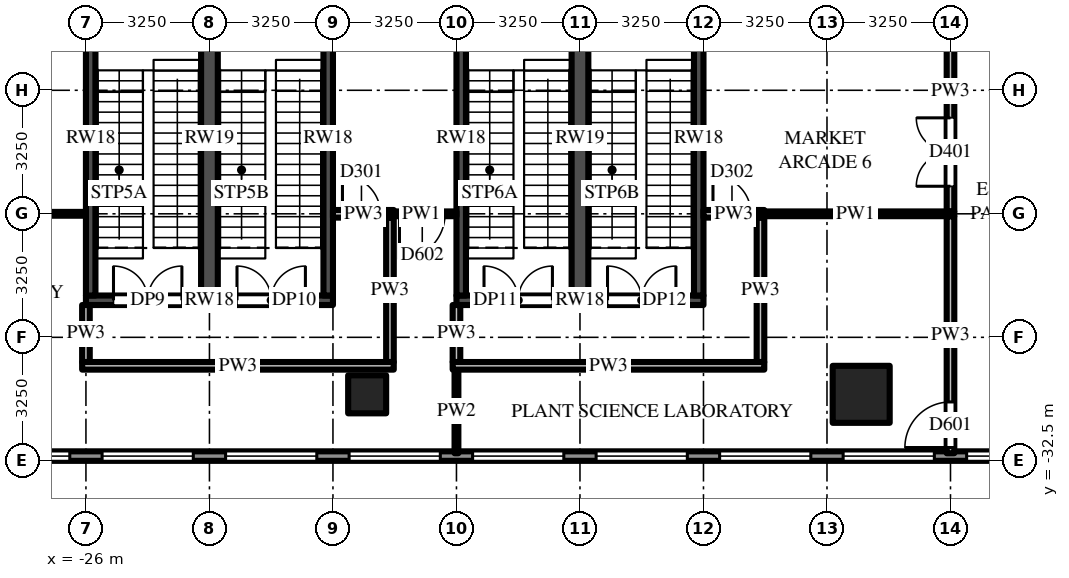
"""IFC4 building model, lengths in metres.
Left out: names, types, materials, properties, quantities, classifications, styles, units other than length and angle.
Written with IfcOpenShell. Run it as: python <this file> out.ifc"""

import sys

from ifc_helpers import new_model, si_unit, direction, frame, frame_2d, origin, origin_2d, place, context, subcontext, project, spatial, rectangle, extrude, source, transform, mapped, element, fill, save


model = new_model("IFC4")
c1 = context("Model", 3, precision=1e-05, world=origin(), true_north=direction((0.0, 1.0)))
c2 = subcontext(c1, "Body", "Model", "MODEL_VIEW")
j1 = project(units=[si_unit("LENGTHUNIT", "METRE"), si_unit("PLANEANGLEUNIT", "RADIAN")], contexts=[c1])
p1 = place(None, origin())
s1 = spatial("IfcSite", under=j1, at=p1, CompositionType="ELEMENT")
p2 = place(p1, origin())
s2 = spatial("IfcBuilding", under=s1, at=p2, CompositionType="ELEMENT")
p3 = place(p2, frame((0.0, 0.0, 24.0)))
s3 = spatial("IfcBuildingStorey", under=s2, at=p3, CompositionType="ELEMENT", Elevation=24.0)
m1 = source(origin(), c2, "Body", "SweptSolid", [
    extrude(rectangle(XDim=1.5, YDim=1.5, at=origin_2d()), origin(), (0.0, 0.0, 1.0), 5.0),
])
p4 = place(p3, frame((-5.6, -30.75, 0.0), z_axis=(0.0, 0.0, 1.0), x_axis=(1.0, 0.0, 0.0)))
e1 = element("IfcColumn", 1, at=p4, inside=s3, PredefinedType="COLUMN", context=c2, shape_type="MappedRepresentation", body=[
    mapped(m1, transform((0.0, 0.0, 0.0))),
])
m2 = source(origin(), c2, "Body", "SweptSolid", [
    extrude(rectangle(XDim=1.0, YDim=1.0, at=origin_2d()), origin(), (0.0, 0.0, 1.0), 5.0),
])
p5 = place(p3, frame((-18.6, -30.75, 0.0), z_axis=(0.0, 0.0, 1.0), x_axis=(1.0, 0.0, 0.0)))
e2 = element("IfcColumn", 2, at=p5, inside=s3, PredefinedType="COLUMN", context=c2, shape_type="MappedRepresentation", body=[
    mapped(m2, transform((0.0, 0.0, 0.0))),
])
m3 = source(origin(), c2, "Body", "SweptSolid", [
    extrude(rectangle(XDim=6.5, YDim=0.25, at=frame_2d((3.25, 0.0))), origin(), (0.0, 0.0, 1.0), 4.7),
])
p6 = place(p3, frame((-26.0, -28.275, 0.0), z_axis=(0.0, 0.0, 1.0), x_axis=(1.0, 0.0, 0.0)))
e3 = element("IfcWall", 3, at=p6, inside=s3, PredefinedType="SHEAR", context=c2, shape_type="MappedRepresentation", body=[
    mapped(m3, transform((0.0, 0.0, 0.0))),
])
m4 = source(origin(), c2, "Body", "SweptSolid", [
    extrude(rectangle(XDim=1.8, YDim=2.1, at=frame_2d((0.9, 1.05))), frame((0.0, 0.135, 0.0), z_axis=(0.0, -1.0, 0.0), x_axis=(1.0, 0.0, 0.0)), (0.0, 0.0, 1.0), 0.27),
])
p7 = place(p6, frame((0.725, 0.0, 0.0)))
e4 = element("IfcOpeningElement", 4, at=p7, cuts=e3, PredefinedType="OPENING", context=c2, shape_type="MappedRepresentation", body=[
    mapped(m4, transform((0.0, 0.0, 0.0))),
])
p8 = place(p6, frame((3.975, 0.0, 0.0)))
e5 = element("IfcOpeningElement", 5, at=p8, cuts=e3, PredefinedType="OPENING", context=c2, shape_type="MappedRepresentation", body=[
    mapped(m4, transform((0.0, 0.0, 0.0))),
])
m5 = source(origin(), c2, "Body", "SweptSolid", [
    extrude(rectangle(XDim=8.3, YDim=0.25, at=frame_2d((4.15, 0.0))), origin(), (0.0, 0.0, 1.0), 4.7),
])
for number, where, z_axis, x_axis in (
    (6, (-25.875, -28.15, 0.0), (0.0, 0.0, 1.0), (0.0, 1.0, 0.0)),
    (7, (-19.625, -28.15, 0.0), (0.0, 0.0, 1.0), (0.0, 1.0, 0.0)),
):
    element("IfcWall", number, at=place(p3, frame(where, z_axis=z_axis, x_axis=x_axis)), inside=s3, PredefinedType="SHEAR", context=c2, shape_type="MappedRepresentation", body=[
        mapped(m5, transform((0.0, 0.0, 0.0))),
    ])
m6 = source(origin(), c2, "Body", "SweptSolid", [
    extrude(rectangle(XDim=8.3, YDim=0.44, at=frame_2d((4.15, 0.0))), origin(), (0.0, 0.0, 1.0), 4.7),
])
p9 = place(p3, frame((-22.75, -28.15, 0.0), z_axis=(0.0, 0.0, 1.0), x_axis=(0.0, 1.0, 0.0)))
e8 = element("IfcWall", 8, at=p9, inside=s3, PredefinedType="SHEAR", context=c2, shape_type="MappedRepresentation", body=[
    mapped(m6, transform((0.0, 0.0, 0.0))),
])
p10 = place(p3, frame((-16.25, -28.275, 0.0), z_axis=(0.0, 0.0, 1.0), x_axis=(1.0, 0.0, 0.0)))
e9 = element("IfcWall", 9, at=p10, inside=s3, PredefinedType="SHEAR", context=c2, shape_type="MappedRepresentation", body=[
    mapped(m3, transform((0.0, 0.0, 0.0))),
])
p11 = place(p10, frame((0.725, 0.0, 0.0)))
e10 = element("IfcOpeningElement", 10, at=p11, cuts=e9, PredefinedType="OPENING", context=c2, shape_type="MappedRepresentation", body=[
    mapped(m4, transform((0.0, 0.0, 0.0))),
])
p12 = place(p10, frame((3.975, 0.0, 0.0)))
e11 = element("IfcOpeningElement", 11, at=p12, cuts=e9, PredefinedType="OPENING", context=c2, shape_type="MappedRepresentation", body=[
    mapped(m4, transform((0.0, 0.0, 0.0))),
])
for number, where, z_axis, x_axis in (
    (12, (-16.125, -28.15, 0.0), (0.0, 0.0, 1.0), (0.0, 1.0, 0.0)),
    (13, (-9.875, -28.15, 0.0), (0.0, 0.0, 1.0), (0.0, 1.0, 0.0)),
):
    element("IfcWall", number, at=place(p3, frame(where, z_axis=z_axis, x_axis=x_axis)), inside=s3, PredefinedType="SHEAR", context=c2, shape_type="MappedRepresentation", body=[
        mapped(m5, transform((0.0, 0.0, 0.0))),
    ])
p13 = place(p3, frame((-13.0, -28.15, 0.0), z_axis=(0.0, 0.0, 1.0), x_axis=(0.0, 1.0, 0.0)))
e14 = element("IfcWall", 14, at=p13, inside=s3, PredefinedType="SHEAR", context=c2, shape_type="MappedRepresentation", body=[
    mapped(m6, transform((0.0, 0.0, 0.0))),
])
m7 = source(origin(), c2, "Body", "SweptSolid", [
    extrude(rectangle(XDim=58.5, YDim=0.25, at=frame_2d((29.25, 0.0))), origin(), (0.0, 0.0, 1.0), 4.7),
])
p14 = place(p3, frame((-29.25, -32.375, 0.0), z_axis=(0.0, 0.0, 1.0), x_axis=(1.0, 0.0, 0.0)))
e15 = element("IfcWall", 15, at=p14, inside=s3, PredefinedType="SOLIDWALL", context=c2, shape_type="MappedRepresentation", body=[
    mapped(m7, transform((0.0, 0.0, 0.0))),
])
m8 = source(origin(), c2, "Body", "SweptSolid", [
    extrude(rectangle(XDim=2.4, YDim=3.3, at=frame_2d((1.2, 1.65))), frame((0.0, 0.135, 0.0), z_axis=(0.0, -1.0, 0.0), x_axis=(1.0, 0.0, 0.0)), (0.0, 0.0, 1.0), 0.27),
])
p15 = place(p14, frame((0.425, 0.0, 0.6)))
e16 = element("IfcOpeningElement", 16, at=p15, cuts=e15, PredefinedType="OPENING", context=c2, shape_type="MappedRepresentation", body=[
    mapped(m8, transform((0.0, 0.0, 0.0))),
])
p16 = place(p14, frame((3.675, 0.0, 0.6)))
e17 = element("IfcOpeningElement", 17, at=p16, cuts=e15, PredefinedType="OPENING", context=c2, shape_type="MappedRepresentation", body=[
    mapped(m8, transform((0.0, 0.0, 0.0))),
])
p17 = place(p14, frame((6.925, 0.0, 0.6)))
e18 = element("IfcOpeningElement", 18, at=p17, cuts=e15, PredefinedType="OPENING", context=c2, shape_type="MappedRepresentation", body=[
    mapped(m8, transform((0.0, 0.0, 0.0))),
])
p18 = place(p14, frame((10.175, 0.0, 0.6)))
e19 = element("IfcOpeningElement", 19, at=p18, cuts=e15, PredefinedType="OPENING", context=c2, shape_type="MappedRepresentation", body=[
    mapped(m8, transform((0.0, 0.0, 0.0))),
])
p19 = place(p14, frame((13.425, 0.0, 0.6)))
e20 = element("IfcOpeningElement", 20, at=p19, cuts=e15, PredefinedType="OPENING", context=c2, shape_type="MappedRepresentation", body=[
    mapped(m8, transform((0.0, 0.0, 0.0))),
])
p20 = place(p14, frame((16.675, 0.0, 0.6)))
e21 = element("IfcOpeningElement", 21, at=p20, cuts=e15, PredefinedType="OPENING", context=c2, shape_type="MappedRepresentation", body=[
    mapped(m8, transform((0.0, 0.0, 0.0))),
])
p21 = place(p14, frame((19.925, 0.0, 0.6)))
e22 = element("IfcOpeningElement", 22, at=p21, cuts=e15, PredefinedType="OPENING", context=c2, shape_type="MappedRepresentation", body=[
    mapped(m8, transform((0.0, 0.0, 0.0))),
])
p22 = place(p14, frame((23.175, 0.0, 0.6)))
e23 = element("IfcOpeningElement", 23, at=p22, cuts=e15, PredefinedType="OPENING", context=c2, shape_type="MappedRepresentation", body=[
    mapped(m8, transform((0.0, 0.0, 0.0))),
])
p23 = place(p14, frame((26.425, 0.0, 0.6)))
e24 = element("IfcOpeningElement", 24, at=p23, cuts=e15, PredefinedType="OPENING", context=c2, shape_type="MappedRepresentation", body=[
    mapped(m8, transform((0.0, 0.0, 0.0))),
])
p24 = place(p14, frame((29.675, 0.0, 0.6)))
e25 = element("IfcOpeningElement", 25, at=p24, cuts=e15, PredefinedType="OPENING", context=c2, shape_type="MappedRepresentation", body=[
    mapped(m8, transform((0.0, 0.0, 0.0))),
])
p25 = place(p14, frame((32.925, 0.0, 0.6)))
e26 = element("IfcOpeningElement", 26, at=p25, cuts=e15, PredefinedType="OPENING", context=c2, shape_type="MappedRepresentation", body=[
    mapped(m8, transform((0.0, 0.0, 0.0))),
])
p26 = place(p14, frame((36.175, 0.0, 0.6)))
e27 = element("IfcOpeningElement", 27, at=p26, cuts=e15, PredefinedType="OPENING", context=c2, shape_type="MappedRepresentation", body=[
    mapped(m8, transform((0.0, 0.0, 0.0))),
])
p27 = place(p14, frame((39.425, 0.0, 0.6)))
e28 = element("IfcOpeningElement", 28, at=p27, cuts=e15, PredefinedType="OPENING", context=c2, shape_type="MappedRepresentation", body=[
    mapped(m8, transform((0.0, 0.0, 0.0))),
])
p28 = place(p14, frame((42.675, 0.0, 0.6)))
e29 = element("IfcOpeningElement", 29, at=p28, cuts=e15, PredefinedType="OPENING", context=c2, shape_type="MappedRepresentation", body=[
    mapped(m8, transform((0.0, 0.0, 0.0))),
])
p29 = place(p14, frame((45.925, 0.0, 0.6)))
e30 = element("IfcOpeningElement", 30, at=p29, cuts=e15, PredefinedType="OPENING", context=c2, shape_type="MappedRepresentation", body=[
    mapped(m8, transform((0.0, 0.0, 0.0))),
])
p30 = place(p14, frame((49.175, 0.0, 0.6)))
e31 = element("IfcOpeningElement", 31, at=p30, cuts=e15, PredefinedType="OPENING", context=c2, shape_type="MappedRepresentation", body=[
    mapped(m8, transform((0.0, 0.0, 0.0))),
])
p31 = place(p14, frame((52.425, 0.0, 0.6)))
e32 = element("IfcOpeningElement", 32, at=p31, cuts=e15, PredefinedType="OPENING", context=c2, shape_type="MappedRepresentation", body=[
    mapped(m8, transform((0.0, 0.0, 0.0))),
])
p32 = place(p14, frame((55.675, 0.0, 0.6)))
e33 = element("IfcOpeningElement", 33, at=p32, cuts=e15, PredefinedType="OPENING", context=c2, shape_type="MappedRepresentation", body=[
    mapped(m8, transform((0.0, 0.0, 0.0))),
])
m9 = source(origin(), c2, "Body", "SweptSolid", [
    extrude(rectangle(XDim=1.5, YDim=0.2, at=frame_2d((0.75, 0.0))), origin(), (0.0, 0.0, 1.0), 4.7),
])
p33 = place(p3, frame((-26.0, -29.9, 0.0), z_axis=(0.0, 0.0, 1.0), x_axis=(0.0, 1.0, 0.0)))
e34 = element("IfcWall", 34, at=p33, inside=s3, PredefinedType="PARTITIONING", context=c2, shape_type="MappedRepresentation", body=[
    mapped(m9, transform((0.0, 0.0, 0.0))),
])
m10 = source(origin(), c2, "Body", "SweptSolid", [
    extrude(rectangle(XDim=3.8, YDim=0.2, at=frame_2d((1.9, 0.0))), origin(), (0.0, 0.0, 1.0), 4.274),
])
p34 = place(p3, frame((-18.0, -29.9, 0.0), z_axis=(0.0, 0.0, 1.0), x_axis=(0.0, 1.0, 0.0)))
e35 = element("IfcWall", 35, at=p34, inside=s3, PredefinedType="PARTITIONING", context=c2, shape_type="MappedRepresentation", body=[
    mapped(m10, transform((0.0, 0.0, 0.0))),
])
p35 = place(p3, frame((-16.25, -29.9, 0.0), z_axis=(0.0, 0.0, 1.0), x_axis=(0.0, 1.0, 0.0)))
e36 = element("IfcWall", 36, at=p35, inside=s3, PredefinedType="PARTITIONING", context=c2, shape_type="MappedRepresentation", body=[
    mapped(m9, transform((0.0, 0.0, 0.0))),
])
m11 = source(origin(), c2, "Body", "SweptSolid", [
    extrude(rectangle(XDim=2.2, YDim=0.1, at=frame_2d((1.1, 0.0))), origin(), (0.0, 0.0, 1.0), 3.762),
])
p36 = place(p3, frame((-16.25, -32.3, 0.0), z_axis=(0.0, 0.0, 1.0), x_axis=(0.0, 1.0, 0.0)))
e37 = element("IfcWall", 37, at=p36, inside=s3, PredefinedType="PARTITIONING", context=c2, shape_type="MappedRepresentation", body=[
    mapped(m11, transform((0.0, 0.0, 0.0))),
])
p37 = place(p3, frame((-8.25, -26.1, 0.0), z_axis=(0.0, 0.0, 1.0), x_axis=(0.0, -1.0, 0.0)))
e38 = element("IfcWall", 38, at=p37, inside=s3, PredefinedType="PARTITIONING", context=c2, shape_type="MappedRepresentation", body=[
    mapped(m10, transform((0.0, 0.0, 0.0))),
])
m12 = source(origin(), c2, "Body", "SweptSolid", [
    extrude(rectangle(XDim=3.188, YDim=0.2, at=frame_2d((1.594, 0.0))), origin(), (0.0, 0.0, 1.0), 4.7),
])
p38 = place(p3, frame((-3.25, -25.938, 0.0), z_axis=(0.0, 0.0, 1.0), x_axis=(0.0, 1.0, 0.0)))
e39 = element("IfcWall", 39, at=p38, inside=s3, PredefinedType="PARTITIONING", context=c2, shape_type="MappedRepresentation", body=[
    mapped(m12, transform((0.0, 0.0, 0.0))),
])
m13 = source(origin(), c2, "Body", "SweptSolid", [
    extrude(rectangle(XDim=1.8, YDim=2.1, at=frame_2d((0.9, 1.05))), frame((0.0, 0.11, 0.0), z_axis=(0.0, -1.0, 0.0), x_axis=(1.0, 0.0, 0.0)), (0.0, 0.0, 1.0), 0.22),
])
p39 = place(p38, frame((0.663, 0.0, 0.0)))
e40 = element("IfcOpeningElement", 40, at=p39, cuts=e39, PredefinedType="OPENING", context=c2, shape_type="MappedRepresentation", body=[
    mapped(m13, transform((0.0, 0.0, 0.0))),
])
m14 = source(origin(), c2, "Body", "SweptSolid", [
    extrude(rectangle(XDim=6.238, YDim=0.2, at=frame_2d((3.119, 0.0))), origin(), (0.0, 0.0, 1.0), 3.918),
])
p40 = place(p3, frame((-3.25, -32.3, 0.0), z_axis=(0.0, 0.0, 1.0), x_axis=(0.0, 1.0, 0.0)))
e41 = element("IfcWall", 41, at=p40, inside=s3, PredefinedType="PARTITIONING", context=c2, shape_type="MappedRepresentation", body=[
    mapped(m14, transform((0.0, 0.0, 0.0))),
])
m15 = source(origin(), c2, "Body", "SweptSolid", [
    extrude(rectangle(XDim=1.2, YDim=2.1, at=frame_2d((0.6, 1.05))), frame((0.0, 0.11, 0.0), z_axis=(0.0, -1.0, 0.0), x_axis=(1.0, 0.0, 0.0)), (0.0, 0.0, 1.0), 0.22),
])
p41 = place(p40, frame((0.15, 0.0, 0.0)))
e42 = element("IfcOpeningElement", 42, at=p41, cuts=e41, PredefinedType="OPENING", context=c2, shape_type="MappedRepresentation", body=[
    mapped(m15, transform((0.0, 0.0, 0.0))),
])
m16 = source(origin(), c2, "Body", "SweptSolid", [
    extrude(rectangle(XDim=3.15, YDim=0.2, at=frame_2d((1.575, 0.0))), origin(), (0.0, 0.0, 1.0), 4.7),
])
p42 = place(p3, frame((-3.25, -22.75, 0.0), z_axis=(0.0, 0.0, 1.0), x_axis=(0.0, 1.0, 0.0)))
e43 = element("IfcWall", 43, at=p42, inside=s3, PredefinedType="PARTITIONING", context=c2, shape_type="MappedRepresentation", body=[
    mapped(m16, transform((0.0, 0.0, 0.0))),
])
m17 = source(origin(), c2, "Body", "SweptSolid", [
    extrude(rectangle(XDim=8.2, YDim=0.2, at=frame_2d((4.1, 0.0))), origin(), (0.0, 0.0, 1.0), 3.762),
])
p43 = place(p3, frame((-26.1, -30.0, 0.0), z_axis=(0.0, 0.0, 1.0), x_axis=(1.0, 0.0, 0.0)))
e44 = element("IfcWall", 44, at=p43, inside=s3, PredefinedType="PARTITIONING", context=c2, shape_type="MappedRepresentation", body=[
    mapped(m17, transform((0.0, 0.0, 0.0))),
])
m18 = source(origin(), c2, "Body", "SweptSolid", [
    extrude(rectangle(XDim=8.2, YDim=0.2, at=frame_2d((4.1, 0.0))), origin(), (0.0, 0.0, 1.0), 4.7),
])
p44 = place(p3, frame((-16.35, -30.0, 0.0), z_axis=(0.0, 0.0, 1.0), x_axis=(1.0, 0.0, 0.0)))
e45 = element("IfcWall", 45, at=p44, inside=s3, PredefinedType="PARTITIONING", context=c2, shape_type="MappedRepresentation", body=[
    mapped(m18, transform((0.0, 0.0, 0.0))),
])
m19 = source(origin(), c2, "Body", "SweptSolid", [
    extrude(rectangle(XDim=1.6, YDim=0.2, at=frame_2d((0.8, 0.0))), origin(), (0.0, 0.0, 1.0), 3.762),
])
p45 = place(p3, frame((-19.5, -26.0, 0.0), z_axis=(0.0, 0.0, 1.0), x_axis=(1.0, 0.0, 0.0)))
e46 = element("IfcWall", 46, at=p45, inside=s3, PredefinedType="PARTITIONING", context=c2, shape_type="MappedRepresentation", body=[
    mapped(m19, transform((0.0, 0.0, 0.0))),
])
m20 = source(origin(), c2, "Body", "SweptSolid", [
    extrude(rectangle(XDim=1.0, YDim=2.1, at=frame_2d((0.5, 1.05))), frame((0.0, 0.11, 0.0), z_axis=(0.0, -1.0, 0.0), x_axis=(1.0, 0.0, 0.0)), (0.0, 0.0, 1.0), 0.22),
])
p46 = place(p45, frame((0.25, 0.0, 0.0)))
e47 = element("IfcOpeningElement", 47, at=p46, cuts=e46, PredefinedType="OPENING", context=c2, shape_type="MappedRepresentation", body=[
    mapped(m20, transform((0.0, 0.0, 0.0))),
])
m21 = source(origin(), c2, "Body", "SweptSolid", [
    extrude(rectangle(XDim=1.6, YDim=0.2, at=frame_2d((0.8, 0.0))), origin(), (0.0, 0.0, 1.0), 4.7),
])
p47 = place(p3, frame((-9.75, -26.0, 0.0), z_axis=(0.0, 0.0, 1.0), x_axis=(1.0, 0.0, 0.0)))
e48 = element("IfcWall", 48, at=p47, inside=s3, PredefinedType="PARTITIONING", context=c2, shape_type="MappedRepresentation", body=[
    mapped(m21, transform((0.0, 0.0, 0.0))),
])
p48 = place(p47, frame((0.25, 0.0, 0.0)))
e49 = element("IfcOpeningElement", 49, at=p48, cuts=e48, PredefinedType="OPENING", context=c2, shape_type="MappedRepresentation", body=[
    mapped(m20, transform((0.0, 0.0, 0.0))),
])
m22 = source(origin(), c2, "Body", "SweptSolid", [
    extrude(rectangle(XDim=6.3, YDim=0.1, at=frame_2d((3.15, 0.0))), origin(), (0.0, 0.0, 1.0), 3.762),
])
p49 = place(p3, frame((-32.3, -26.0, 0.0), z_axis=(0.0, 0.0, 1.0), x_axis=(1.0, 0.0, 0.0)))
e50 = element("IfcWall", 50, at=p49, inside=s3, PredefinedType="PARTITIONING", context=c2, shape_type="MappedRepresentation", body=[
    mapped(m22, transform((0.0, 0.0, 0.0))),
])
m23 = source(origin(), c2, "Body", "SweptSolid", [
    extrude(rectangle(XDim=1.85, YDim=0.125, at=frame_2d((0.925, 0.0))), origin(), (0.0, 0.0, 1.0), 4.7),
])
p50 = place(p3, frame((-16.25, -26.0, 0.0), z_axis=(0.0, 0.0, 1.0), x_axis=(-1.0, 0.0, 0.0)))
e51 = element("IfcWall", 51, at=p50, inside=s3, PredefinedType="PARTITIONING", context=c2, shape_type="MappedRepresentation", body=[
    mapped(m23, transform((0.0, 0.0, 0.0))),
])
m24 = source(origin(), c2, "Body", "SweptSolid", [
    extrude(rectangle(XDim=1.2, YDim=2.1, at=frame_2d((0.6, 1.05))), frame((0.0, 0.073, 0.0), z_axis=(0.0, -1.0, 0.0), x_axis=(1.0, 0.0, 0.0)), (0.0, 0.0, 1.0), 0.145),
])
p51 = place(p50, frame((0.3, 0.0, 0.0)))
e52 = element("IfcOpeningElement", 52, at=p51, cuts=e51, PredefinedType="OPENING", context=c2, shape_type="MappedRepresentation", body=[
    mapped(m24, transform((0.0, 0.0, 0.0))),
])
m25 = source(origin(), c2, "Body", "SweptSolid", [
    extrude(rectangle(XDim=5.2, YDim=0.125, at=frame_2d((2.6, 0.0))), origin(), (0.0, 0.0, 1.0), 3.762),
])
p52 = place(p3, frame((-3.15, -26.0, 0.0), z_axis=(0.0, 0.0, 1.0), x_axis=(-1.0, 0.0, 0.0)))
e53 = element("IfcWall", 53, at=p52, inside=s3, PredefinedType="PARTITIONING", context=c2, shape_type="MappedRepresentation", body=[
    mapped(m25, transform((0.0, 0.0, 0.0))),
])
m26 = source(origin(), c2, "Body", "SweptSolid", [
    extrude(rectangle(XDim=1.8, YDim=2.1, at=frame_2d((0.9, 1.05))), frame((0.0, 0.025, 0.0), z_axis=(0.0, -1.0, 0.0), x_axis=(1.0, 0.0, 0.0)), (0.0, 0.0, 1.0), 0.05),
])
p53 = place(p7, origin())
e54 = element("IfcDoor", 54, at=p53, inside=s3, OperationType="DOUBLE_DOOR_SINGLE_SWING", PredefinedType="DOOR", context=c2, shape_type="MappedRepresentation", body=[
    mapped(m26, transform((0.0, 0.0, 0.0))),
])
fill(e4, e54)
p54 = place(p8, origin())
e55 = element("IfcDoor", 55, at=p54, inside=s3, OperationType="DOUBLE_DOOR_SINGLE_SWING", PredefinedType="DOOR", context=c2, shape_type="MappedRepresentation", body=[
    mapped(m26, transform((0.0, 0.0, 0.0))),
])
fill(e5, e55)
p55 = place(p11, origin())
e56 = element("IfcDoor", 56, at=p55, inside=s3, OperationType="DOUBLE_DOOR_SINGLE_SWING", PredefinedType="DOOR", context=c2, shape_type="MappedRepresentation", body=[
    mapped(m26, transform((0.0, 0.0, 0.0))),
])
fill(e10, e56)
p56 = place(p12, origin())
e57 = element("IfcDoor", 57, at=p56, inside=s3, OperationType="DOUBLE_DOOR_SINGLE_SWING", PredefinedType="DOOR", context=c2, shape_type="MappedRepresentation", body=[
    mapped(m26, transform((0.0, 0.0, 0.0))),
])
fill(e11, e57)
m27 = source(origin(), c2, "Body", "SweptSolid", [
    extrude(rectangle(XDim=2.4, YDim=3.3, at=frame_2d((1.2, 1.65))), frame((0.0, 0.03, 0.0), z_axis=(0.0, -1.0, 0.0), x_axis=(1.0, 0.0, 0.0)), (0.0, 0.0, 1.0), 0.06),
])
p57 = place(p15, origin())
e58 = element("IfcWindow", 58, at=p57, inside=s3, PartitioningType="SINGLE_PANEL", PredefinedType="WINDOW", context=c2, shape_type="MappedRepresentation", body=[
    mapped(m27, transform((0.0, 0.0, 0.0))),
])
fill(e16, e58)
p58 = place(p16, origin())
e59 = element("IfcWindow", 59, at=p58, inside=s3, PartitioningType="SINGLE_PANEL", PredefinedType="WINDOW", context=c2, shape_type="MappedRepresentation", body=[
    mapped(m27, transform((0.0, 0.0, 0.0))),
])
fill(e17, e59)
p59 = place(p17, origin())
e60 = element("IfcWindow", 60, at=p59, inside=s3, PartitioningType="SINGLE_PANEL", PredefinedType="WINDOW", context=c2, shape_type="MappedRepresentation", body=[
    mapped(m27, transform((0.0, 0.0, 0.0))),
])
fill(e18, e60)
p60 = place(p18, origin())
e61 = element("IfcWindow", 61, at=p60, inside=s3, PartitioningType="SINGLE_PANEL", PredefinedType="WINDOW", context=c2, shape_type="MappedRepresentation", body=[
    mapped(m27, transform((0.0, 0.0, 0.0))),
])
fill(e19, e61)
p61 = place(p19, origin())
e62 = element("IfcWindow", 62, at=p61, inside=s3, PartitioningType="SINGLE_PANEL", PredefinedType="WINDOW", context=c2, shape_type="MappedRepresentation", body=[
    mapped(m27, transform((0.0, 0.0, 0.0))),
])
fill(e20, e62)
p62 = place(p20, origin())
e63 = element("IfcWindow", 63, at=p62, inside=s3, PartitioningType="SINGLE_PANEL", PredefinedType="WINDOW", context=c2, shape_type="MappedRepresentation", body=[
    mapped(m27, transform((0.0, 0.0, 0.0))),
])
fill(e21, e63)
p63 = place(p21, origin())
e64 = element("IfcWindow", 64, at=p63, inside=s3, PartitioningType="SINGLE_PANEL", PredefinedType="WINDOW", context=c2, shape_type="MappedRepresentation", body=[
    mapped(m27, transform((0.0, 0.0, 0.0))),
])
fill(e22, e64)
p64 = place(p22, origin())
e65 = element("IfcWindow", 65, at=p64, inside=s3, PartitioningType="SINGLE_PANEL", PredefinedType="WINDOW", context=c2, shape_type="MappedRepresentation", body=[
    mapped(m27, transform((0.0, 0.0, 0.0))),
])
fill(e23, e65)
p65 = place(p23, origin())
e66 = element("IfcWindow", 66, at=p65, inside=s3, PartitioningType="SINGLE_PANEL", PredefinedType="WINDOW", context=c2, shape_type="MappedRepresentation", body=[
    mapped(m27, transform((0.0, 0.0, 0.0))),
])
fill(e24, e66)
m28 = source(origin(), c2, "Body", "SweptSolid", [
    extrude(rectangle(XDim=1.2, YDim=2.1, at=frame_2d((0.6, 1.05))), frame((0.0, 0.025, 0.0), z_axis=(0.0, -1.0, 0.0), x_axis=(1.0, 0.0, 0.0)), (0.0, 0.0, 1.0), 0.05),
])
p66 = place(p41, origin())
e67 = element("IfcDoor", 67, at=p66, inside=s3, OperationType="SINGLE_SWING_LEFT", PredefinedType="DOOR", context=c2, shape_type="MappedRepresentation", body=[
    mapped(m28, transform((0.0, 0.0, 0.0))),
])
fill(e42, e67)
m29 = source(origin(), c2, "Body", "SweptSolid", [
    extrude(rectangle(XDim=1.0, YDim=2.1, at=frame_2d((0.5, 1.05))), frame((0.0, 0.025, 0.0), z_axis=(0.0, -1.0, 0.0), x_axis=(1.0, 0.0, 0.0)), (0.0, 0.0, 1.0), 0.05),
])
p67 = place(p46, origin())
e68 = element("IfcDoor", 68, at=p67, inside=s3, OperationType="SINGLE_SWING_LEFT", PredefinedType="DOOR", context=c2, shape_type="MappedRepresentation", body=[
    mapped(m29, transform((0.0, 0.0, 0.0))),
])
fill(e47, e68)
p68 = place(p51, origin())
e69 = element("IfcDoor", 69, at=p68, inside=s3, OperationType="SINGLE_SWING_RIGHT", PredefinedType="DOOR", context=c2, shape_type="MappedRepresentation", body=[
    mapped(m28, transform((0.0, 0.0, 0.0))),
])
fill(e52, e69)
p69 = place(p48, origin())
e70 = element("IfcDoor", 70, at=p69, inside=s3, OperationType="SINGLE_SWING_LEFT", PredefinedType="DOOR", context=c2, shape_type="MappedRepresentation", body=[
    mapped(m29, transform((0.0, 0.0, 0.0))),
])
fill(e49, e70)
p70 = place(p39, origin())
e71 = element("IfcDoor", 71, at=p70, inside=s3, OperationType="DOUBLE_DOOR_SINGLE_SWING", PredefinedType="DOOR", context=c2, shape_type="MappedRepresentation", body=[
    mapped(m26, transform((0.0, 0.0, 0.0))),
])
fill(e40, e71)
save(model, sys.argv[1])
